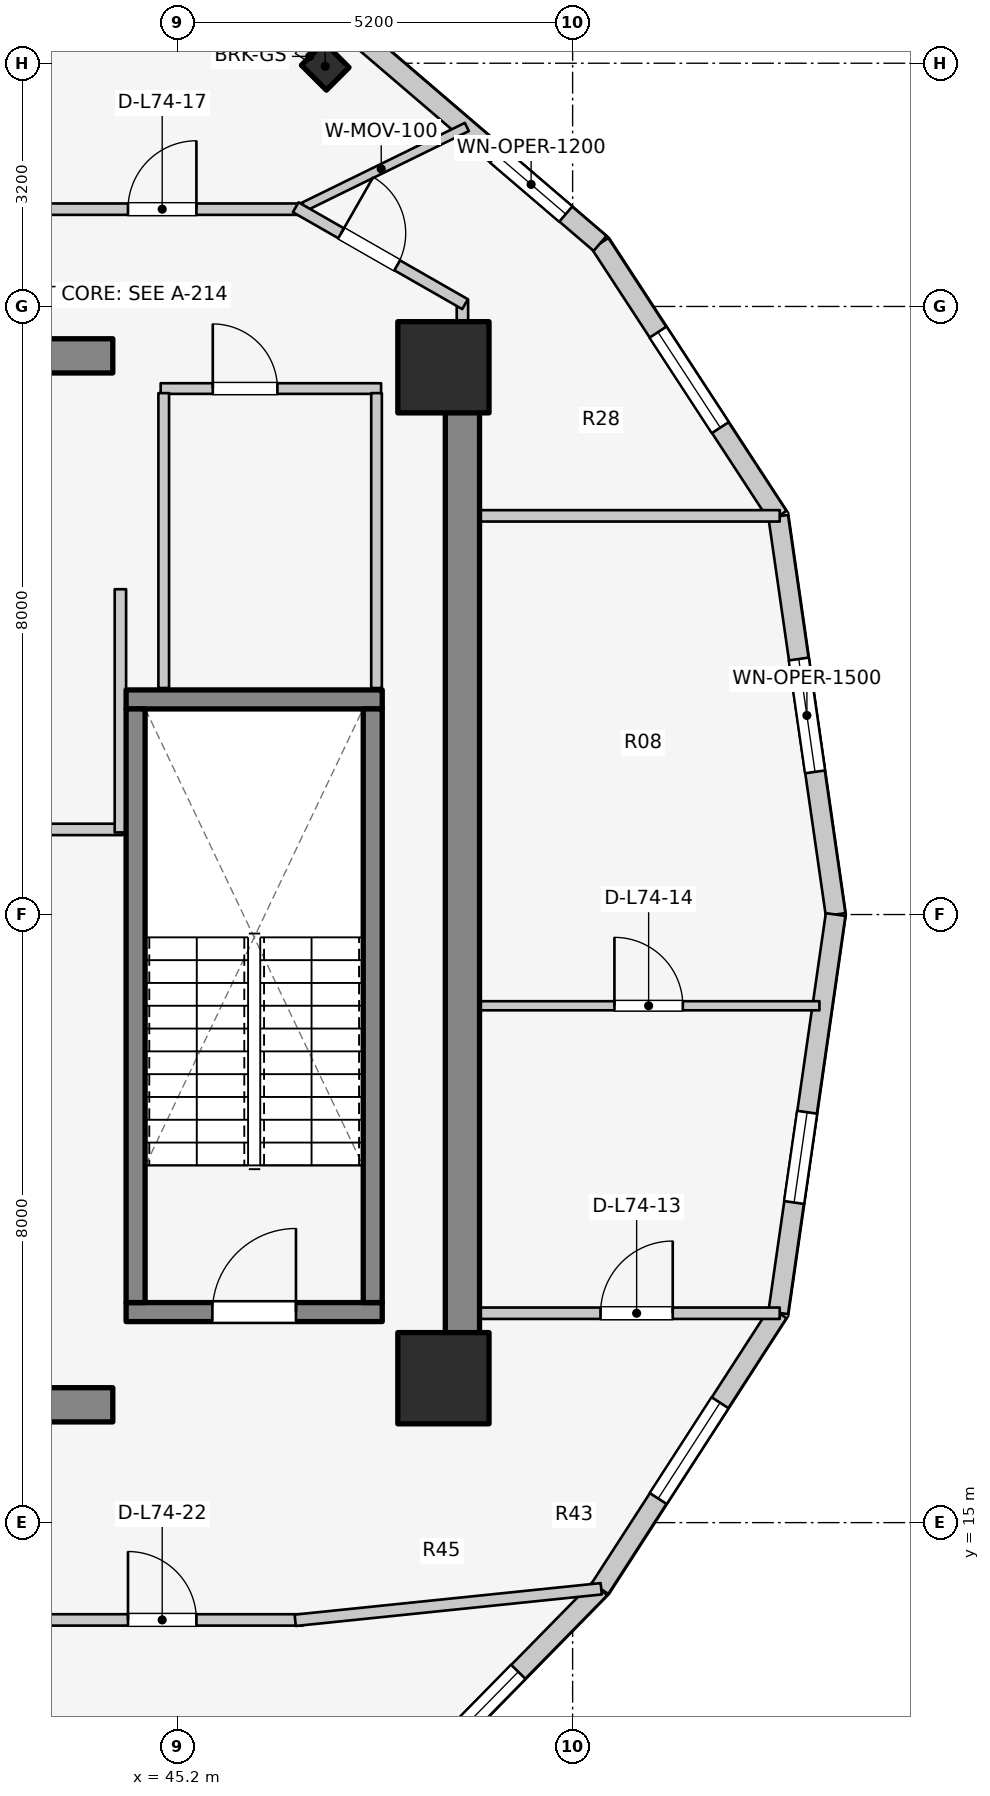
"""IFC4 building model, lengths in metres.
Left out: names, types, materials, properties, quantities, classifications, styles, units other than length and angle.
Written with IfcOpenShell. Run it as: python <this file> out.ifc"""

import sys

from ifc_helpers import new_model, si_unit, direction, frame, frame_2d, origin, origin_2d, place, context, subcontext, project, spatial, rectangle, i_section, extrude, element, fill, save


model = new_model("IFC4")
c1 = context("Model", 3, precision=1e-05, world=origin(), true_north=direction((0.0, 1.0)))
c2 = subcontext(c1, "Body", "Model", "MODEL_VIEW")
j1 = project(units=[si_unit("LENGTHUNIT", "METRE"), si_unit("PLANEANGLEUNIT", "RADIAN")], contexts=[c1])
p1 = place(None, origin())
s1 = spatial("IfcSite", under=j1, at=p1, CompositionType="ELEMENT")
p2 = place(p1, origin())
s2 = spatial("IfcBuilding", under=s1, at=p2, CompositionType="ELEMENT")
p3 = place(p2, frame((0.0, 0.0, 242.4)))
s3 = spatial("IfcBuildingStorey", under=s2, at=p3, CompositionType="ELEMENT", Elevation=242.4)
p4 = place(p3, frame((48.95, 17.05, 0.0), z_axis=(0.0, 0.0, 1.0), x_axis=(0.0, 1.0, 0.0)))
e1 = element("IfcWall", 1, at=p4, inside=s3, PredefinedType="SHEAR", context=c2, shape_type="SweptSolid", body=[
    extrude(rectangle(XDim=12.8, YDim=0.45, at=frame_2d((6.4, 0.0))), origin(), (0.0, 0.0, 1.0), 3.6),
])
for number, where, z_axis, x_axis in (
    (2, (39.85, 16.55, 0.0), (0.0, 0.0, 1.0), (1.0, 0.0, 0.0)),
    (3, (39.85, 30.35, 0.0), (0.0, 0.0, 1.0), (1.0, 0.0, 0.0)),
):
    element("IfcWall", number, at=place(p3, frame(where, z_axis=z_axis, x_axis=x_axis)), inside=s3, PredefinedType="SHEAR", context=c2, shape_type="SweptSolid", body=[
        extrude(rectangle(XDim=4.5, YDim=0.45, at=frame_2d((2.25, 0.0))), origin(), (0.0, 0.0, 1.0), 3.6),
    ])
p5 = place(p3, frame((44.525, 17.77, 0.0), z_axis=(0.0, 0.0, 1.0), x_axis=(1.0, 0.0, 0.0)))
e4 = element("IfcWall", 4, at=p5, inside=s3, PredefinedType="SOLIDWALL", context=c2, shape_type="SweptSolid", body=[
    extrude(rectangle(XDim=3.37, YDim=0.25, at=frame_2d((1.685, 0.0))), origin(), (0.0, 0.0, 1.0), 3.6),
])
p6 = place(p5, frame((1.135, 0.0, 0.0)))
e5 = element("IfcOpeningElement", 5, at=p6, cuts=e4, PredefinedType="OPENING", context=c2, shape_type="SweptSolid", body=[
    extrude(rectangle(XDim=1.1, YDim=2.1, at=frame_2d((0.55, 1.05))), frame((0.0, 0.135, 0.0), z_axis=(0.0, -1.0, 0.0), x_axis=(1.0, 0.0, 0.0)), (0.0, 0.0, 1.0), 0.27),
])
p7 = place(p3, frame((44.525, 25.83, 0.0), z_axis=(0.0, 0.0, 1.0), x_axis=(1.0, 0.0, 0.0)))
e6 = element("IfcWall", 6, at=p7, inside=s3, PredefinedType="SOLIDWALL", context=c2, shape_type="SweptSolid", body=[
    extrude(rectangle(XDim=3.37, YDim=0.25, at=frame_2d((1.685, 0.0))), origin(), (0.0, 0.0, 1.0), 3.6),
])
for number, where, z_axis, x_axis in (
    (7, (44.65, 17.895, 0.0), (0.0, 0.0, 1.0), (0.0, 1.0, 0.0)),
    (8, (47.77, 17.895, 0.0), (0.0, 0.0, 1.0), (0.0, 1.0, 0.0)),
):
    element("IfcWall", number, at=place(p3, frame(where, z_axis=z_axis, x_axis=x_axis)), inside=s3, PredefinedType="SOLIDWALL", context=c2, shape_type="SweptSolid", body=[
        extrude(rectangle(XDim=7.81, YDim=0.25, at=frame_2d((3.905, 0.0))), origin(), (0.0, 0.0, 1.0), 3.6),
    ])
for number, where, z_axis, x_axis in (
    (9, (48.7, 16.9, 0.0), (0.0, 0.0, 1.0), (1.0, 0.0, 0.0)),
    (10, (48.7, 30.2, 0.0), (0.0, 0.0, 1.0), (1.0, 0.0, 0.0)),
):
    element("IfcColumn", number, at=place(p3, frame(where, z_axis=z_axis, x_axis=x_axis)), inside=s3, PredefinedType="COLUMN", context=c2, shape_type="SweptSolid", body=[
        extrude(rectangle(XDim=1.2, YDim=1.2, at=origin_2d()), origin(), (0.0, 0.0, 1.0), 3.6),
    ])
p8 = place(p3, frame((47.145, 34.159, 0.0), z_axis=(0.0, 0.0, 1.0), x_axis=(0.707106781187, 0.707106781187, 0.0)))
e11 = element("IfcColumn", 11, at=p8, inside=s3, PredefinedType="COLUMN", context=c2, shape_type="SweptSolid", body=[
    extrude(i_section(OverallWidth=0.422, OverallDepth=0.465, WebThickness=0.045, FlangeThickness=0.073, FilletRadius=0.025, at=origin_2d()), origin(), (0.0, 0.0, 1.0), 3.6),
])
p9 = place(p3, frame((53.86, 23.0, 0.0), z_axis=(0.0, 0.0, 1.0), x_axis=(-0.142712754019, 0.989764148593, 0.0)))
e12 = element("IfcWall", 12, at=p9, inside=s3, PredefinedType="STANDARD", context=c2, shape_type="SweptSolid", body=[
    extrude(rectangle(XDim=5.293, YDim=0.26, at=frame_2d((2.646, 0.0))), origin(), (0.0, 0.0, 1.0), 3.29),
])
p10 = place(p9, frame((1.896, 0.0, 0.75)))
e13 = element("IfcOpeningElement", 13, at=p10, cuts=e12, PredefinedType="OPENING", context=c2, shape_type="SweptSolid", body=[
    extrude(rectangle(XDim=1.5, YDim=1.6, at=frame_2d((0.75, 0.8))), frame((0.0, 0.14, 0.0), z_axis=(0.0, -1.0, 0.0), x_axis=(1.0, 0.0, 0.0)), (0.0, 0.0, 1.0), 0.28),
])
p11 = place(p3, frame((53.105, 28.239, 0.0), z_axis=(0.0, 0.0, 1.0), x_axis=(-0.546606419826, 0.837389647539, 0.0)))
e14 = element("IfcWall", 14, at=p11, inside=s3, PredefinedType="STANDARD", context=c2, shape_type="SweptSolid", body=[
    extrude(rectangle(XDim=4.288, YDim=0.26, at=frame_2d((2.144, 0.0))), origin(), (0.0, 0.0, 1.0), 3.29),
])
p12 = place(p11, frame((1.394, 0.0, 0.75)))
e15 = element("IfcOpeningElement", 15, at=p12, cuts=e14, PredefinedType="OPENING", context=c2, shape_type="SweptSolid", body=[
    extrude(rectangle(XDim=1.5, YDim=1.6, at=frame_2d((0.75, 0.8))), frame((0.0, 0.14, 0.0), z_axis=(0.0, -1.0, 0.0), x_axis=(1.0, 0.0, 0.0)), (0.0, 0.0, 1.0), 0.28),
])
p13 = place(p3, frame((50.761, 31.829, 0.0), z_axis=(0.0, 0.0, 1.0), x_axis=(-0.759587504333, 0.650405122413, 0.0)))
e16 = element("IfcWall", 16, at=p13, inside=s3, PredefinedType="STANDARD", context=c2, shape_type="SweptSolid", body=[
    extrude(rectangle(XDim=4.217, YDim=0.26, at=frame_2d((2.109, 0.0))), origin(), (0.0, 0.0, 1.0), 3.29),
])
p14 = place(p13, frame((0.594, 0.0, 0.75)))
e17 = element("IfcOpeningElement", 17, at=p14, cuts=e16, PredefinedType="OPENING", context=c2, shape_type="SweptSolid", body=[
    extrude(rectangle(XDim=1.2, YDim=1.5, at=frame_2d((0.6, 0.75))), frame((0.0, 0.14, 0.0), z_axis=(0.0, -1.0, 0.0), x_axis=(1.0, 0.0, 0.0)), (0.0, 0.0, 1.0), 0.28),
])
p15 = place(p3, frame((47.558, 10.871, 0.0), z_axis=(0.0, 0.0, 1.0), x_axis=(0.700642973333, 0.713512034881, 0.0)))
e18 = element("IfcWall", 18, at=p15, inside=s3, PredefinedType="STANDARD", context=c2, shape_type="SweptSolid", body=[
    extrude(rectangle(XDim=4.572, YDim=0.26, at=frame_2d((2.286, 0.0))), origin(), (0.0, 0.0, 1.0), 3.29),
])
p16 = place(p15, frame((1.536, 0.0, 0.75)))
e19 = element("IfcOpeningElement", 19, at=p16, cuts=e18, PredefinedType="OPENING", context=c2, shape_type="SweptSolid", body=[
    extrude(rectangle(XDim=1.5, YDim=1.6, at=frame_2d((0.75, 0.8))), frame((0.0, 0.14, 0.0), z_axis=(0.0, -1.0, 0.0), x_axis=(1.0, 0.0, 0.0)), (0.0, 0.0, 1.0), 0.28),
])
p17 = place(p3, frame((50.761, 14.133, 0.0), z_axis=(0.0, 0.0, 1.0), x_axis=(0.542641766008, 0.839964233634, 0.0)))
e20 = element("IfcWall", 20, at=p17, inside=s3, PredefinedType="STANDARD", context=c2, shape_type="SweptSolid", body=[
    extrude(rectangle(XDim=4.319, YDim=0.26, at=frame_2d((2.16, 0.0))), origin(), (0.0, 0.0, 1.0), 3.29),
])
p18 = place(p17, frame((1.41, 0.0, 0.75)))
e21 = element("IfcOpeningElement", 21, at=p18, cuts=e20, PredefinedType="OPENING", context=c2, shape_type="SweptSolid", body=[
    extrude(rectangle(XDim=1.5, YDim=1.6, at=frame_2d((0.75, 0.8))), frame((0.0, 0.14, 0.0), z_axis=(0.0, -1.0, 0.0), x_axis=(1.0, 0.0, 0.0)), (0.0, 0.0, 1.0), 0.28),
])
p19 = place(p3, frame((53.105, 17.761, 0.0), z_axis=(0.0, 0.0, 1.0), x_axis=(0.142712754019, 0.989764148593, 0.0)))
e22 = element("IfcWall", 22, at=p19, inside=s3, PredefinedType="STANDARD", context=c2, shape_type="SweptSolid", body=[
    extrude(rectangle(XDim=5.293, YDim=0.26, at=frame_2d((2.646, 0.0))), origin(), (0.0, 0.0, 1.0), 3.29),
])
p20 = place(p19, frame((1.465, 0.0, 0.75)))
e23 = element("IfcOpeningElement", 23, at=p20, cuts=e22, PredefinedType="OPENING", context=c2, shape_type="SweptSolid", body=[
    extrude(rectangle(XDim=1.2, YDim=1.5, at=frame_2d((0.6, 0.75))), frame((0.0, 0.14, 0.0), z_axis=(0.0, -1.0, 0.0), x_axis=(1.0, 0.0, 0.0)), (0.0, 0.0, 1.0), 0.28),
])
p21 = place(p3, frame((39.4, 24.12, 0.0), z_axis=(0.0, 0.0, 1.0), x_axis=(1.0, 0.0, 0.0)))
e24 = element("IfcWall", 24, at=p21, inside=s3, PredefinedType="PARTITIONING", context=c2, shape_type="SweptSolid", body=[
    extrude(rectangle(XDim=5.08, YDim=0.15, at=frame_2d((2.54, 0.0))), origin(), (0.0, 0.0, 1.0), 2.62),
])
p22 = place(p3, frame((44.45, 24.08, 0.0), z_axis=(0.0, 0.0, 1.0), x_axis=(0.0, 1.0, 0.0)))
e25 = element("IfcWall", 25, at=p22, inside=s3, PredefinedType="PARTITIONING", context=c2, shape_type="SweptSolid", body=[
    extrude(rectangle(XDim=3.2, YDim=0.15, at=frame_2d((1.6, 0.0))), origin(), (0.0, 0.0, 1.0), 3.295),
])
p23 = place(p3, frame((44.98, 29.92, 0.0), z_axis=(0.0, 0.0, 1.0), x_axis=(1.0, 0.0, 0.0)))
e26 = element("IfcWall", 26, at=p23, inside=s3, PredefinedType="PLUMBINGWALL", context=c2, shape_type="SweptSolid", body=[
    extrude(rectangle(XDim=2.9, YDim=0.14, at=frame_2d((1.45, 0.0))), origin(), (0.0, 0.0, 1.0), 3.295),
])
p24 = place(p23, frame((0.686, 0.0, 0.0)))
e27 = element("IfcOpeningElement", 27, at=p24, cuts=e26, PredefinedType="OPENING", context=c2, shape_type="SweptSolid", body=[
    extrude(rectangle(XDim=0.85, YDim=2.05, at=frame_2d((0.425, 1.025))), frame((0.0, 0.08, 0.0), z_axis=(0.0, -1.0, 0.0), x_axis=(1.0, 0.0, 0.0)), (0.0, 0.0, 1.0), 0.16),
])
for number, where, z_axis, x_axis in (
    (28, (45.02, 25.98, 0.0), (0.0, 0.0, 1.0), (0.0, 1.0, 0.0)),
    (29, (47.82, 25.98, 0.0), (0.0, 0.0, 1.0), (0.0, 1.0, 0.0)),
):
    element("IfcWall", number, at=place(p3, frame(where, z_axis=z_axis, x_axis=x_axis)), inside=s3, PredefinedType="PLUMBINGWALL", context=c2, shape_type="SweptSolid", body=[
        extrude(rectangle(XDim=3.88, YDim=0.14, at=frame_2d((1.94, 0.0))), origin(), (0.0, 0.0, 1.0), 3.295),
    ])
p25 = place(p3, frame((48.95, 17.755, 0.0), z_axis=(0.0, 0.0, 1.0), x_axis=(1.0, 0.0, 0.0)))
e30 = element("IfcWall", 30, at=p25, inside=s3, PredefinedType="PARTITIONING", context=c2, shape_type="SweptSolid", body=[
    extrude(rectangle(XDim=4.175, YDim=0.15, at=frame_2d((2.087, 0.0))), origin(), (0.0, 0.0, 1.0), 3.295),
])
p26 = place(p25, frame((1.817, 0.0, 0.0)))
e31 = element("IfcOpeningElement", 31, at=p26, cuts=e30, PredefinedType="OPENING", context=c2, shape_type="SweptSolid", body=[
    extrude(rectangle(XDim=0.95, YDim=2.1, at=frame_2d((0.475, 1.05))), frame((0.0, 0.085, 0.0), z_axis=(0.0, -1.0, 0.0), x_axis=(1.0, 0.0, 0.0)), (0.0, 0.0, 1.0), 0.17),
])
p27 = place(p3, frame((48.95, 28.245, 0.0), z_axis=(0.0, 0.0, 1.0), x_axis=(1.0, 0.0, 0.0)))
e32 = element("IfcWall", 32, at=p27, inside=s3, PredefinedType="PARTITIONING", context=c2, shape_type="SweptSolid", body=[
    extrude(rectangle(XDim=4.175, YDim=0.15, at=frame_2d((2.087, 0.0))), origin(), (0.0, 0.0, 1.0), 3.295),
])
p28 = place(p3, frame((48.95, 21.8, 0.0), z_axis=(0.0, 0.0, 1.0), x_axis=(1.0, 0.0, 0.0)))
e33 = element("IfcWall", 33, at=p28, inside=s3, PredefinedType="MOVABLE", context=c2, shape_type="SweptSolid", body=[
    extrude(rectangle(XDim=4.697, YDim=0.12, at=frame_2d((2.349, 0.0))), origin(), (0.0, 0.0, 1.0), 3.295),
])
p29 = place(p28, frame((2.0, 0.0, 0.0)))
e34 = element("IfcOpeningElement", 34, at=p29, cuts=e33, PredefinedType="OPENING", context=c2, shape_type="SweptSolid", body=[
    extrude(rectangle(XDim=0.9, YDim=2.1, at=frame_2d((0.45, 1.05))), frame((0.0, 0.07, 0.0), z_axis=(0.0, -1.0, 0.0), x_axis=(1.0, 0.0, 0.0)), (0.0, 0.0, 1.0), 0.14),
])
p30 = place(p3, frame((48.95, 29.8, 0.0), z_axis=(0.0, 0.0, 1.0), x_axis=(0.0, 1.0, 0.0)))
e35 = element("IfcWall", 35, at=p30, inside=s3, PredefinedType="PARTITIONING", context=c2, shape_type="SweptSolid", body=[
    extrude(rectangle(XDim=1.29, YDim=0.15, at=frame_2d((0.645, 0.0))), origin(), (0.0, 0.0, 1.0), 3.295),
])
p31 = place(p3, frame((46.755, 32.258, 0.0), z_axis=(0.0, 0.0, 1.0), x_axis=(0.898152129572, 0.439684832745, 0.0)))
e36 = element("IfcWall", 36, at=p31, inside=s3, PredefinedType="MOVABLE", context=c2, shape_type="SweptSolid", body=[
    extrude(rectangle(XDim=2.509, YDim=0.12, at=frame_2d((1.254, 0.0))), origin(), (0.0, 0.0, 1.0), 2.66),
])
p32 = place(p3, frame((39.33, 32.28, 0.0), z_axis=(0.0, 0.0, 1.0), x_axis=(1.0, 0.0, 0.0)))
e37 = element("IfcWall", 37, at=p32, inside=s3, PredefinedType="PARTITIONING", context=c2, shape_type="SweptSolid", body=[
    extrude(rectangle(XDim=7.52, YDim=0.15, at=frame_2d((3.76, 0.0))), origin(), (0.0, 0.0, 1.0), 2.816),
])
p33 = place(p32, frame((5.22, 0.0, 0.0)))
e38 = element("IfcOpeningElement", 38, at=p33, cuts=e37, PredefinedType="OPENING", context=c2, shape_type="SweptSolid", body=[
    extrude(rectangle(XDim=0.9, YDim=2.1, at=frame_2d((0.45, 1.05))), frame((0.0, 0.085, 0.0), z_axis=(0.0, -1.0, 0.0), x_axis=(1.0, 0.0, 0.0)), (0.0, 0.0, 1.0), 0.17),
])
p34 = place(p3, frame((46.757, 32.305, 0.0), z_axis=(0.0, 0.0, 1.0), x_axis=(0.867991349648, -0.496579315857, 0.0)))
e39 = element("IfcWall", 39, at=p34, inside=s3, PredefinedType="PARTITIONING", context=c2, shape_type="SweptSolid", body=[
    extrude(rectangle(XDim=2.567, YDim=0.15, at=frame_2d((1.283, 0.0))), origin(), (0.0, 0.0, 1.0), 2.66),
])
p35 = place(p34, frame((0.688, 0.0, 0.0)))
e40 = element("IfcOpeningElement", 40, at=p35, cuts=e39, PredefinedType="OPENING", context=c2, shape_type="SweptSolid", body=[
    extrude(rectangle(XDim=0.85, YDim=2.05, at=frame_2d((0.425, 1.025))), frame((0.0, 0.085, 0.0), z_axis=(0.0, -1.0, 0.0), x_axis=(1.0, 0.0, 0.0)), (0.0, 0.0, 1.0), 0.17),
])
p36 = place(p3, frame((39.33, 13.72, 0.0), z_axis=(0.0, 0.0, 1.0), x_axis=(1.0, 0.0, 0.0)))
e41 = element("IfcWall", 41, at=p36, inside=s3, PredefinedType="PARTITIONING", context=c2, shape_type="SweptSolid", body=[
    extrude(rectangle(XDim=7.52, YDim=0.15, at=frame_2d((3.76, 0.0))), origin(), (0.0, 0.0, 1.0), 2.816),
])
p37 = place(p36, frame((5.22, 0.0, 0.0)))
e42 = element("IfcOpeningElement", 42, at=p37, cuts=e41, PredefinedType="OPENING", context=c2, shape_type="SweptSolid", body=[
    extrude(rectangle(XDim=0.9, YDim=2.1, at=frame_2d((0.45, 1.05))), frame((0.0, 0.085, 0.0), z_axis=(0.0, -1.0, 0.0), x_axis=(1.0, 0.0, 0.0)), (0.0, 0.0, 1.0), 0.17),
])
p38 = place(p3, frame((46.75, 13.715, 0.0), z_axis=(0.0, 0.0, 1.0), x_axis=(0.994734711466, 0.102483431859, 0.0)))
e43 = element("IfcWall", 43, at=p38, inside=s3, PredefinedType="PARTITIONING", context=c2, shape_type="SweptSolid", body=[
    extrude(rectangle(XDim=4.047, YDim=0.15, at=frame_2d((2.024, 0.0))), origin(), (0.0, 0.0, 1.0), 2.66),
])
p39 = place(p10, origin())
e44 = element("IfcWindow", 44, at=p39, inside=s3, PartitioningType="SINGLE_PANEL", PredefinedType="WINDOW", context=c2, shape_type="SweptSolid", body=[
    extrude(rectangle(XDim=1.5, YDim=1.6, at=frame_2d((0.75, 0.8))), frame((0.0, 0.03, 0.0), z_axis=(0.0, -1.0, 0.0), x_axis=(1.0, 0.0, 0.0)), (0.0, 0.0, 1.0), 0.06),
])
fill(e13, e44)
p40 = place(p12, origin())
e45 = element("IfcWindow", 45, at=p40, inside=s3, PartitioningType="SINGLE_PANEL", PredefinedType="WINDOW", context=c2, shape_type="SweptSolid", body=[
    extrude(rectangle(XDim=1.5, YDim=1.6, at=frame_2d((0.75, 0.8))), frame((0.0, 0.03, 0.0), z_axis=(0.0, -1.0, 0.0), x_axis=(1.0, 0.0, 0.0)), (0.0, 0.0, 1.0), 0.06),
])
fill(e15, e45)
p41 = place(p14, origin())
e46 = element("IfcWindow", 46, at=p41, inside=s3, PartitioningType="SINGLE_PANEL", PredefinedType="WINDOW", context=c2, shape_type="SweptSolid", body=[
    extrude(rectangle(XDim=1.2, YDim=1.5, at=frame_2d((0.6, 0.75))), frame((0.0, 0.03, 0.0), z_axis=(0.0, -1.0, 0.0), x_axis=(1.0, 0.0, 0.0)), (0.0, 0.0, 1.0), 0.06),
])
fill(e17, e46)
p42 = place(p16, origin())
e47 = element("IfcWindow", 47, at=p42, inside=s3, PartitioningType="SINGLE_PANEL", PredefinedType="WINDOW", context=c2, shape_type="SweptSolid", body=[
    extrude(rectangle(XDim=1.5, YDim=1.6, at=frame_2d((0.75, 0.8))), frame((0.0, 0.03, 0.0), z_axis=(0.0, -1.0, 0.0), x_axis=(1.0, 0.0, 0.0)), (0.0, 0.0, 1.0), 0.06),
])
fill(e19, e47)
p43 = place(p18, origin())
e48 = element("IfcWindow", 48, at=p43, inside=s3, PartitioningType="SINGLE_PANEL", PredefinedType="WINDOW", context=c2, shape_type="SweptSolid", body=[
    extrude(rectangle(XDim=1.5, YDim=1.6, at=frame_2d((0.75, 0.8))), frame((0.0, 0.03, 0.0), z_axis=(0.0, -1.0, 0.0), x_axis=(1.0, 0.0, 0.0)), (0.0, 0.0, 1.0), 0.06),
])
fill(e21, e48)
p44 = place(p20, origin())
e49 = element("IfcWindow", 49, at=p44, inside=s3, PartitioningType="SINGLE_PANEL", PredefinedType="WINDOW", context=c2, shape_type="SweptSolid", body=[
    extrude(rectangle(XDim=1.2, YDim=1.5, at=frame_2d((0.6, 0.75))), frame((0.0, 0.03, 0.0), z_axis=(0.0, -1.0, 0.0), x_axis=(1.0, 0.0, 0.0)), (0.0, 0.0, 1.0), 0.06),
])
fill(e23, e49)
p45 = place(p6, origin())
e50 = element("IfcDoor", 50, at=p45, inside=s3, OperationType="SINGLE_SWING_RIGHT", PredefinedType="DOOR", context=c2, shape_type="SweptSolid", body=[
    extrude(rectangle(XDim=1.1, YDim=2.1, at=frame_2d((0.55, 1.05))), frame((0.0, 0.025, 0.0), z_axis=(0.0, -1.0, 0.0), x_axis=(1.0, 0.0, 0.0)), (0.0, 0.0, 1.0), 0.05),
])
fill(e5, e50)
p46 = place(p24, origin())
e51 = element("IfcDoor", 51, at=p46, inside=s3, OperationType="SINGLE_SWING_LEFT", PredefinedType="DOOR", context=c2, shape_type="SweptSolid", body=[
    extrude(rectangle(XDim=0.85, YDim=2.05, at=frame_2d((0.425, 1.025))), frame((0.0, 0.025, 0.0), z_axis=(0.0, -1.0, 0.0), x_axis=(1.0, 0.0, 0.0)), (0.0, 0.0, 1.0), 0.05),
])
fill(e27, e51)
p47 = place(p26, origin())
e52 = element("IfcDoor", 52, at=p47, inside=s3, OperationType="SINGLE_SWING_RIGHT", PredefinedType="DOOR", context=c2, shape_type="SweptSolid", body=[
    extrude(rectangle(XDim=0.95, YDim=2.1, at=frame_2d((0.475, 1.05))), frame((0.0, 0.025, 0.0), z_axis=(0.0, -1.0, 0.0), x_axis=(1.0, 0.0, 0.0)), (0.0, 0.0, 1.0), 0.05),
])
fill(e31, e52)
p48 = place(p29, origin())
e53 = element("IfcDoor", 53, at=p48, inside=s3, OperationType="SINGLE_SWING_LEFT", PredefinedType="DOOR", context=c2, shape_type="SweptSolid", body=[
    extrude(rectangle(XDim=0.9, YDim=2.1, at=frame_2d((0.45, 1.05))), frame((0.0, 0.025, 0.0), z_axis=(0.0, -1.0, 0.0), x_axis=(1.0, 0.0, 0.0)), (0.0, 0.0, 1.0), 0.05),
])
fill(e34, e53)
p49 = place(p33, origin())
e54 = element("IfcDoor", 54, at=p49, inside=s3, OperationType="SINGLE_SWING_RIGHT", PredefinedType="DOOR", context=c2, shape_type="SweptSolid", body=[
    extrude(rectangle(XDim=0.9, YDim=2.1, at=frame_2d((0.45, 1.05))), frame((0.0, 0.025, 0.0), z_axis=(0.0, -1.0, 0.0), x_axis=(1.0, 0.0, 0.0)), (0.0, 0.0, 1.0), 0.05),
])
fill(e38, e54)
p50 = place(p35, origin())
e55 = element("IfcDoor", 55, at=p50, inside=s3, OperationType="SINGLE_SWING_LEFT", PredefinedType="DOOR", context=c2, shape_type="SweptSolid", body=[
    extrude(rectangle(XDim=0.85, YDim=2.05, at=frame_2d((0.425, 1.025))), frame((0.0, 0.025, 0.0), z_axis=(0.0, -1.0, 0.0), x_axis=(1.0, 0.0, 0.0)), (0.0, 0.0, 1.0), 0.05),
])
fill(e40, e55)
p51 = place(p37, origin())
e56 = element("IfcDoor", 56, at=p51, inside=s3, OperationType="SINGLE_SWING_LEFT", PredefinedType="DOOR", context=c2, shape_type="SweptSolid", body=[
    extrude(rectangle(XDim=0.9, YDim=2.1, at=frame_2d((0.45, 1.05))), frame((0.0, 0.025, 0.0), z_axis=(0.0, -1.0, 0.0), x_axis=(1.0, 0.0, 0.0)), (0.0, 0.0, 1.0), 0.05),
])
fill(e42, e56)
save(model, sys.argv[1])
